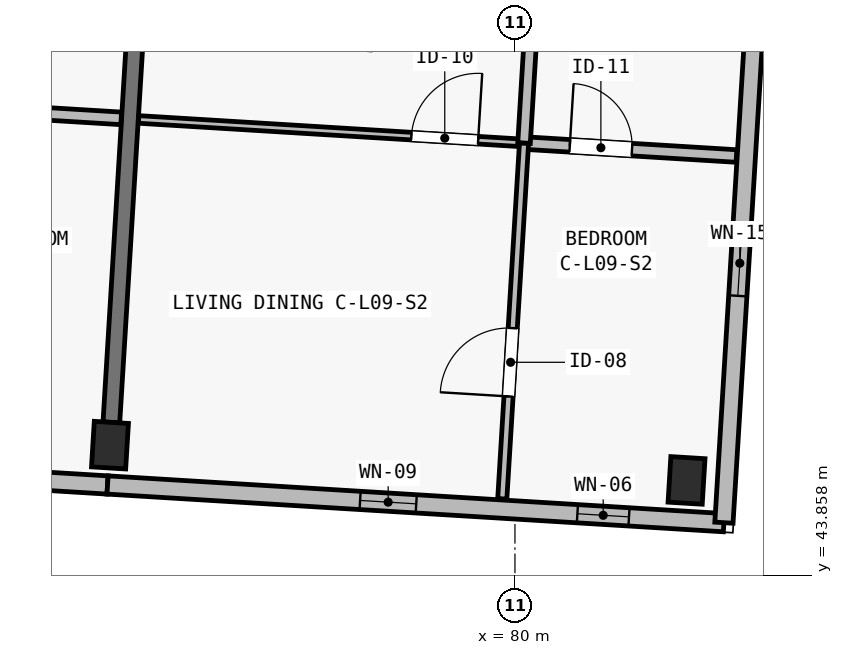
"""IFC4 building model, lengths in metres.
Left out: names, types, materials, properties, quantities, classifications, styles, units other than length and angle.
Written with IfcOpenShell. Run it as: python <this file> out.ifc"""

import sys

from ifc_helpers import new_model, si_unit, direction, frame, frame_2d, origin, origin_2d, place, context, subcontext, project, spatial, polyline, rectangle, outline, extrude, element, fill, save


model = new_model("IFC4")
c1 = context("Model", 3, precision=1e-05, world=origin(), true_north=direction((0.0, 1.0)))
c2 = subcontext(c1, "Body", "Model", "MODEL_VIEW")
j1 = project(units=[si_unit("LENGTHUNIT", "METRE"), si_unit("PLANEANGLEUNIT", "RADIAN")], contexts=[c1])
p1 = place(None, origin())
s1 = spatial("IfcSite", under=j1, at=p1, CompositionType="ELEMENT")
p2 = place(p1, origin())
s2 = spatial("IfcBuilding", under=s1, at=p2, CompositionType="ELEMENT")
p3 = place(p2, frame((0.0, 0.0, 31.15)))
s3 = spatial("IfcBuildingStorey", under=s2, at=p3, CompositionType="ELEMENT", Elevation=31.15)
p4 = place(p3, frame((74.672, 45.572, 0.0), z_axis=(0.0, 0.0, 1.0), x_axis=(0.998134798422, -0.061048539535, 0.0)))
e1 = element("IfcColumn", 1, at=p4, inside=s3, PredefinedType="COLUMN", context=c2, shape_type="SweptSolid", body=[
    extrude(rectangle(XDim=0.45, YDim=0.6, at=origin_2d()), origin(), (0.0, 0.0, 1.0), 3.25),
])
p5 = place(p3, frame((82.258, 45.108, 0.0), z_axis=(0.0, 0.0, 1.0), x_axis=(0.998134798422, -0.061048539535, 0.0)))
e2 = element("IfcColumn", 2, at=p5, inside=s3, PredefinedType="COLUMN", context=c2, shape_type="SweptSolid", body=[
    extrude(rectangle(XDim=0.45, YDim=0.6, at=origin_2d()), origin(), (0.0, 0.0, 1.0), 3.0),
])
p6 = place(p3, frame((74.69, 45.872, 0.0), z_axis=(0.0, 0.0, 1.0), x_axis=(0.061036313012, 0.998135546153, 0.0)))
e3 = element("IfcWall", 3, at=p6, inside=s3, PredefinedType="SHEAR", context=c2, shape_type="SweptSolid", body=[
    extrude(rectangle(XDim=7.0, YDim=0.22, at=frame_2d((3.5, 0.0))), origin(), (0.0, 0.0, 1.0), 2.5),
])
p7 = place(p3, frame((74.64, 45.048, 0.0), z_axis=(0.0, 0.0, 1.0), x_axis=(-0.998135669243, 0.061034300063, 0.0)))
e4 = element("IfcWall", 4, at=p7, inside=s3, PredefinedType="SOLIDWALL", context=c2, shape_type="SweptSolid", body=[
    extrude(outline(polyline([(0.0, 0.0), (7.6, 0.0), (7.6, 5.998), (0.0, 4.535), (0.0, 0.0)])), frame((0.0, 0.12, 0.0), z_axis=(0.0, -1.0, 0.0), x_axis=(1.0, 0.0, 0.0)), (0.0, 0.0, 1.0), 0.24),
])
p8 = place(p7, frame((5.019, 0.0, 0.0)))
e5 = element("IfcOpeningElement", 5, at=p8, cuts=e4, PredefinedType="OPENING", context=c2, shape_type="SweptSolid", body=[
    extrude(rectangle(XDim=1.8, YDim=2.12, at=frame_2d((0.9, 1.06))), frame((0.0, 0.135, 0.0), z_axis=(0.0, -1.0, 0.0), x_axis=(1.0, 0.0, 0.0)), (0.0, 0.0, 1.0), 0.27),
])
p9 = place(p7, frame((1.03, 0.0, 0.46)))
e6 = element("IfcOpeningElement", 6, at=p9, cuts=e4, PredefinedType="OPENING", context=c2, shape_type="SweptSolid", body=[
    extrude(rectangle(XDim=0.78, YDim=2.2, at=frame_2d((0.39, 1.1))), frame((0.0, 0.135, 0.0), z_axis=(0.0, -1.0, 0.0), x_axis=(1.0, 0.0, 0.0)), (0.0, 0.0, 1.0), 0.27),
])
p10 = place(p3, frame((82.75, 44.552, 0.0), z_axis=(0.0, 0.0, 1.0), x_axis=(-0.998134248939, 0.061057522844, 0.0)))
e7 = element("IfcWall", 7, at=p10, inside=s3, PredefinedType="SOLIDWALL", context=c2, shape_type="SweptSolid", body=[
    extrude(outline(polyline([(0.0, 0.0), (8.125, 0.0), (8.125, 4.535), (0.0, 2.972), (0.0, 0.0)])), frame((0.0, 0.12, 0.0), z_axis=(0.0, -1.0, 0.0), x_axis=(1.0, 0.0, 0.0)), (0.0, 0.0, 1.0), 0.24),
])
p11 = place(p10, frame((1.251, 0.0, 0.52)))
e8 = element("IfcOpeningElement", 8, at=p11, cuts=e7, PredefinedType="OPENING", context=c2, shape_type="SweptSolid", body=[
    extrude(rectangle(XDim=0.68, YDim=2.24, at=frame_2d((0.34, 1.12))), frame((0.0, 0.135, 0.0), z_axis=(0.0, -1.0, 0.0), x_axis=(1.0, 0.0, 0.0)), (0.0, 0.0, 1.0), 0.27),
])
p12 = place(p10, frame((4.056, 0.0, 0.52)))
e9 = element("IfcOpeningElement", 9, at=p12, cuts=e7, PredefinedType="OPENING", context=c2, shape_type="SweptSolid", body=[
    extrude(rectangle(XDim=0.74, YDim=2.26, at=frame_2d((0.37, 1.13))), frame((0.0, 0.135, 0.0), z_axis=(0.0, -1.0, 0.0), x_axis=(1.0, 0.0, 0.0)), (0.0, 0.0, 1.0), 0.27),
])
p13 = place(p3, frame((84.01, 65.164, 0.0), z_axis=(0.0, 0.0, 1.0), x_axis=(-0.061040833846, -0.998135269692, 0.0)))
e10 = element("IfcWall", 10, at=p13, inside=s3, PredefinedType="SOLIDWALL", context=c2, shape_type="SweptSolid", body=[
    extrude(rectangle(XDim=20.65, YDim=0.24, at=frame_2d((10.325, 0.0))), origin(), (0.0, 0.0, 1.0), 2.972),
])
p14 = place(p13, frame((2.63, 0.0, 0.52)))
e11 = element("IfcOpeningElement", 11, at=p14, cuts=e10, PredefinedType="OPENING", context=c2, shape_type="SweptSolid", body=[
    extrude(rectangle(XDim=0.72, YDim=2.16, at=frame_2d((0.36, 1.08))), frame((0.0, 0.135, 0.0), z_axis=(0.0, -1.0, 0.0), x_axis=(1.0, 0.0, 0.0)), (0.0, 0.0, 1.0), 0.27),
])
p15 = place(p13, frame((16.8, 0.0, 0.45)))
e12 = element("IfcOpeningElement", 12, at=p15, cuts=e10, PredefinedType="OPENING", context=c2, shape_type="SweptSolid", body=[
    extrude(rectangle(XDim=0.86, YDim=2.36, at=frame_2d((0.43, 1.18))), frame((0.0, 0.135, 0.0), z_axis=(0.0, -1.0, 0.0), x_axis=(1.0, 0.0, 0.0)), (0.0, 0.0, 1.0), 0.27),
])
p16 = place(p3, frame((71.141, 50.096, 0.0), z_axis=(0.0, 0.0, 1.0), x_axis=(0.998136472989, -0.061021154439, 0.0)))
e13 = element("IfcWall", 13, at=p16, inside=s3, PredefinedType="PLUMBINGWALL", context=c2, shape_type="SweptSolid", body=[
    extrude(rectangle(XDim=3.685, YDim=0.165, at=frame_2d((1.842, 0.0))), origin(), (0.0, 0.0, 1.0), 3.15),
])
p17 = place(p16, frame((1.3, 0.0, 0.0)))
e14 = element("IfcOpeningElement", 14, at=p17, cuts=e13, PredefinedType="OPENING", context=c2, shape_type="SweptSolid", body=[
    extrude(rectangle(XDim=0.82, YDim=2.08, at=frame_2d((0.41, 1.04))), frame((0.0, 0.097, 0.0), z_axis=(0.0, -1.0, 0.0), x_axis=(1.0, 0.0, 0.0)), (0.0, 0.0, 1.0), 0.195),
])
p18 = place(p3, frame((75.049, 49.857, 0.0), z_axis=(0.0, 0.0, 1.0), x_axis=(0.998135637207, -0.061034823981, 0.0)))
e15 = element("IfcWall", 15, at=p18, inside=s3, PredefinedType="PARTITIONING", context=c2, shape_type="SweptSolid", body=[
    extrude(rectangle(XDim=5.08, YDim=0.1, at=frame_2d((2.54, 0.0))), origin(), (0.0, 0.0, 1.0), 3.018),
])
p19 = place(p18, frame((3.595, 0.0, 0.0)))
e16 = element("IfcOpeningElement", 16, at=p19, cuts=e15, PredefinedType="OPENING", context=c2, shape_type="SweptSolid", body=[
    extrude(rectangle(XDim=0.88, YDim=2.1, at=frame_2d((0.44, 1.05))), frame((0.0, 0.065, 0.0), z_axis=(0.0, -1.0, 0.0), x_axis=(1.0, 0.0, 0.0)), (0.0, 0.0, 1.0), 0.13),
])
p20 = place(p3, frame((80.119, 49.547, 0.0), z_axis=(0.0, 0.0, 1.0), x_axis=(0.998135805996, -0.061032063609, 0.0)))
e17 = element("IfcWall", 17, at=p20, inside=s3, PredefinedType="PLUMBINGWALL", context=c2, shape_type="SweptSolid", body=[
    extrude(rectangle(XDim=2.8, YDim=0.165, at=frame_2d((1.4, 0.0))), origin(), (0.0, 0.0, 1.0), 3.018),
])
p21 = place(p20, frame((0.603, 0.0, 0.0)))
e18 = element("IfcOpeningElement", 18, at=p21, cuts=e17, PredefinedType="OPENING", context=c2, shape_type="SweptSolid", body=[
    extrude(rectangle(XDim=0.82, YDim=2.08, at=frame_2d((0.41, 1.04))), frame((0.0, 0.097, 0.0), z_axis=(0.0, -1.0, 0.0), x_axis=(1.0, 0.0, 0.0)), (0.0, 0.0, 1.0), 0.195),
])
p22 = place(p3, frame((79.833, 44.866, 0.0), z_axis=(0.0, 0.0, 1.0), x_axis=(0.061010571843, 0.998137119901, 0.0)))
e19 = element("IfcWall", 19, at=p22, inside=s3, PredefinedType="PARTITIONING", context=c2, shape_type="SweptSolid", body=[
    extrude(rectangle(XDim=4.69, YDim=0.12, at=frame_2d((2.345, 0.0))), origin(), (0.0, 0.0, 1.0), 3.018),
])
p23 = place(p22, frame((1.35, 0.0, 0.0)))
e20 = element("IfcOpeningElement", 20, at=p23, cuts=e19, PredefinedType="OPENING", context=c2, shape_type="SweptSolid", body=[
    extrude(rectangle(XDim=0.9, YDim=2.1, at=frame_2d((0.45, 1.05))), frame((0.0, 0.075, 0.0), z_axis=(0.0, -1.0, 0.0), x_axis=(1.0, 0.0, 0.0)), (0.0, 0.0, 1.0), 0.15),
])
p24 = place(p3, frame((80.119, 49.547, 0.0), z_axis=(0.0, 0.0, 1.0), x_axis=(0.061099388563, 0.998131687062, 0.0)))
e21 = element("IfcWall", 21, at=p24, inside=s3, PredefinedType="PLUMBINGWALL", context=c2, shape_type="SweptSolid", body=[
    extrude(rectangle(XDim=3.72, YDim=0.165, at=frame_2d((1.86, 0.0))), origin(), (0.0, 0.0, 1.0), 3.018),
])
p25 = place(p11, origin())
e22 = element("IfcWindow", 22, at=p25, inside=s3, PartitioningType="SINGLE_PANEL", PredefinedType="WINDOW", context=c2, shape_type="SweptSolid", body=[
    extrude(rectangle(XDim=0.68, YDim=2.24, at=frame_2d((0.34, 1.12))), frame((0.0, 0.03, 0.0), z_axis=(0.0, -1.0, 0.0), x_axis=(1.0, 0.0, 0.0)), (0.0, 0.0, 1.0), 0.06),
])
fill(e8, e22)
p26 = place(p12, origin())
e23 = element("IfcWindow", 23, at=p26, inside=s3, PartitioningType="SINGLE_PANEL", PredefinedType="WINDOW", context=c2, shape_type="SweptSolid", body=[
    extrude(rectangle(XDim=0.74, YDim=2.26, at=frame_2d((0.37, 1.13))), frame((0.0, 0.03, 0.0), z_axis=(0.0, -1.0, 0.0), x_axis=(1.0, 0.0, 0.0)), (0.0, 0.0, 1.0), 0.06),
])
fill(e9, e23)
p27 = place(p15, origin())
e24 = element("IfcWindow", 24, at=p27, inside=s3, PartitioningType="SINGLE_PANEL", PredefinedType="WINDOW", context=c2, shape_type="SweptSolid", body=[
    extrude(rectangle(XDim=0.86, YDim=2.36, at=frame_2d((0.43, 1.18))), frame((0.0, 0.03, 0.0), z_axis=(0.0, -1.0, 0.0), x_axis=(1.0, 0.0, 0.0)), (0.0, 0.0, 1.0), 0.06),
])
fill(e12, e24)
p28 = place(p19, origin())
e25 = element("IfcDoor", 25, at=p28, inside=s3, OperationType="SINGLE_SWING_RIGHT", PredefinedType="DOOR", context=c2, shape_type="SweptSolid", body=[
    extrude(rectangle(XDim=0.88, YDim=2.1, at=frame_2d((0.44, 1.05))), frame((0.0, 0.025, 0.0), z_axis=(0.0, -1.0, 0.0), x_axis=(1.0, 0.0, 0.0)), (0.0, 0.0, 1.0), 0.05),
])
fill(e16, e25)
p29 = place(p21, origin())
e26 = element("IfcDoor", 26, at=p29, inside=s3, OperationType="SINGLE_SWING_LEFT", PredefinedType="DOOR", context=c2, shape_type="SweptSolid", body=[
    extrude(rectangle(XDim=0.82, YDim=2.08, at=frame_2d((0.41, 1.04))), frame((0.0, 0.025, 0.0), z_axis=(0.0, -1.0, 0.0), x_axis=(1.0, 0.0, 0.0)), (0.0, 0.0, 1.0), 0.05),
])
fill(e18, e26)
p30 = place(p23, origin())
e27 = element("IfcDoor", 27, at=p30, inside=s3, OperationType="SINGLE_SWING_LEFT", PredefinedType="DOOR", context=c2, shape_type="SweptSolid", body=[
    extrude(rectangle(XDim=0.9, YDim=2.1, at=frame_2d((0.45, 1.05))), frame((0.0, 0.025, 0.0), z_axis=(0.0, -1.0, 0.0), x_axis=(1.0, 0.0, 0.0)), (0.0, 0.0, 1.0), 0.05),
])
fill(e20, e27)
save(model, sys.argv[1])
